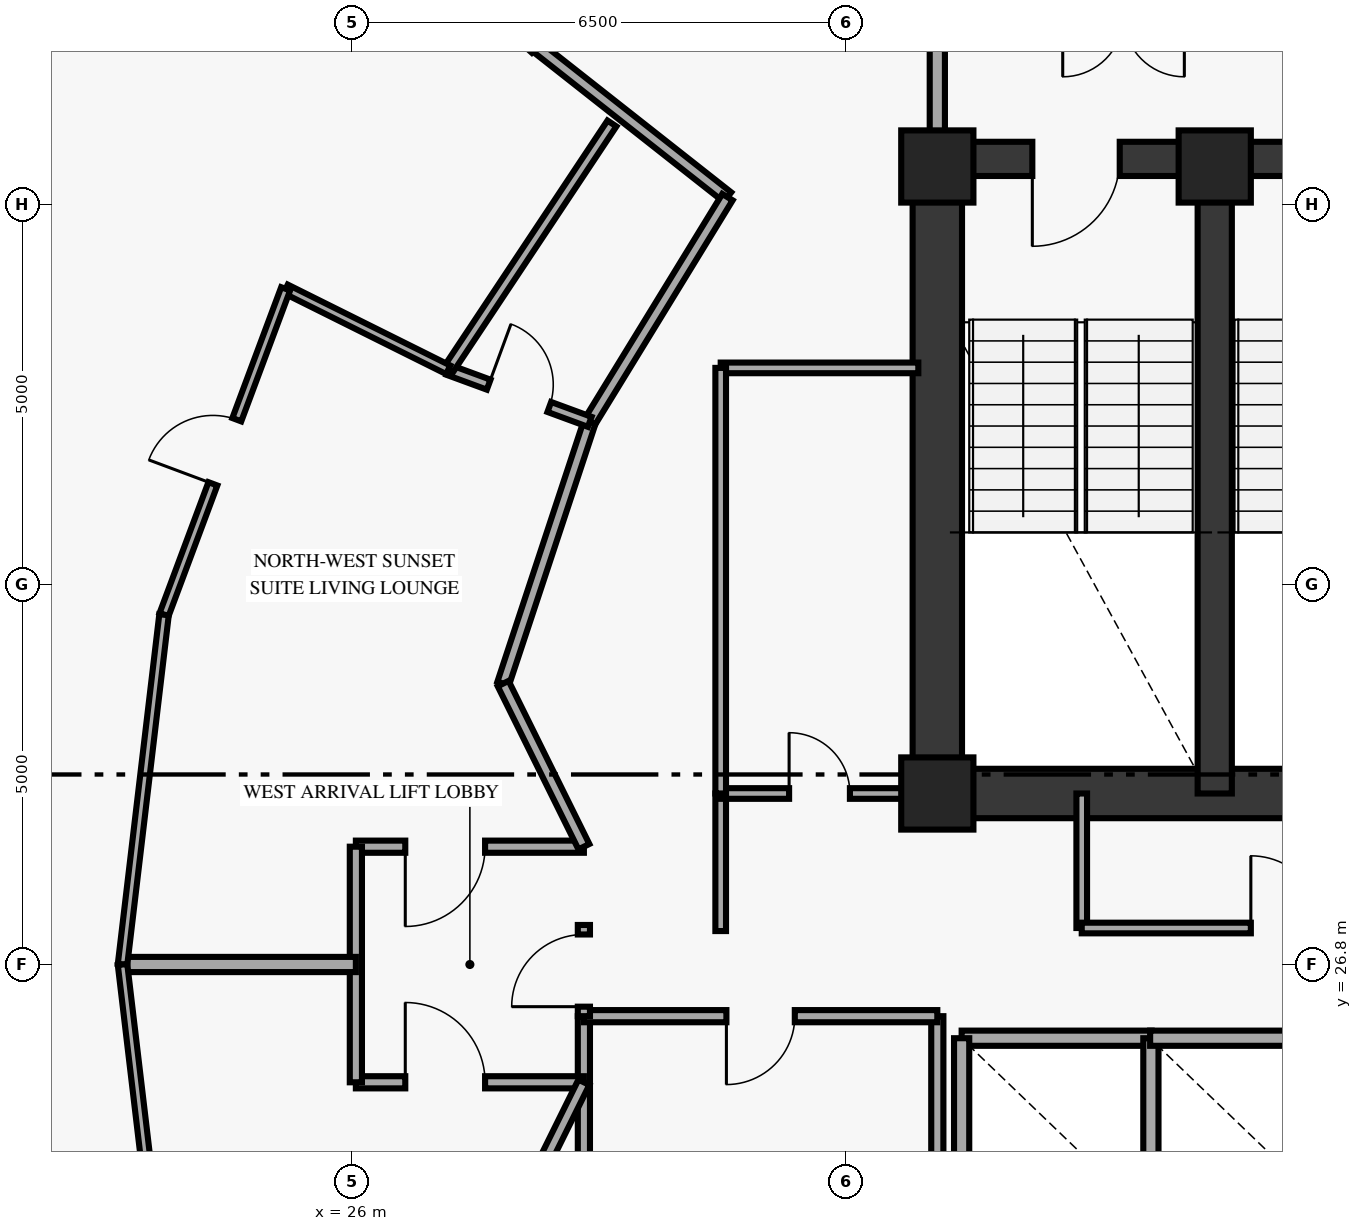
"""IFC4 building model, lengths in metres.
Left out: names, types, materials, properties, quantities, classifications, styles, units other than length and angle.
Written with IfcOpenShell. Run it as: python <this file> out.ifc"""

import sys

from ifc_helpers import new_model, si_unit, direction, frame, frame_2d, origin, origin_2d, place, context, subcontext, project, spatial, rectangle, extrude, element, fill, save


model = new_model("IFC4")
c1 = context("Model", 3, precision=1e-05, world=origin(), true_north=direction((0.0, 1.0)))
c2 = subcontext(c1, "Body", "Model", "MODEL_VIEW")
j1 = project(units=[si_unit("LENGTHUNIT", "METRE"), si_unit("PLANEANGLEUNIT", "RADIAN")], contexts=[c1])
p1 = place(None, origin())
s1 = spatial("IfcSite", under=j1, at=p1, CompositionType="ELEMENT")
p2 = place(p1, origin())
s2 = spatial("IfcBuilding", under=s1, at=p2, CompositionType="ELEMENT")
p3 = place(p2, frame((0.0, 0.0, 192.25)))
s3 = spatial("IfcBuildingStorey", under=s2, at=p3, CompositionType="ELEMENT", Elevation=192.25)
for number, where, z_axis, x_axis in (
    (1, (37.35, 37.3, 0.0), (0.0, 0.0, 1.0), (1.0, 0.0, 0.0)),
    (2, (33.7, 37.3, 0.0), (0.0, 0.0, 1.0), (1.0, 0.0, 0.0)),
    (3, (33.7, 29.05, 0.0), (0.0, 0.0, 1.0), (1.0, 0.0, 0.0)),
):
    element("IfcColumn", number, at=place(p3, frame(where, z_axis=z_axis, x_axis=x_axis)), inside=s3, PredefinedType="PILASTER", context=c2, shape_type="SweptSolid", body=[
        extrude(rectangle(XDim=0.95, YDim=0.95, at=origin_2d()), origin(), (0.0, 0.0, 1.0), 3.35),
    ])
p4 = place(p3, frame((33.7, 29.05, 0.0), z_axis=(0.0, 0.0, 1.0), x_axis=(0.0, 1.0, 0.0)))
e4 = element("IfcWall", 4, at=p4, inside=s3, PredefinedType="SHEAR", context=c2, shape_type="SweptSolid", body=[
    extrude(rectangle(XDim=8.35, YDim=0.65, at=frame_2d((4.175, 0.0))), origin(), (0.0, 0.0, 1.0), 3.35),
])
p5 = place(p3, frame((33.7, 29.05, 0.0), z_axis=(0.0, 0.0, 1.0), x_axis=(1.0, 0.0, 0.0)))
e5 = element("IfcWall", 5, at=p5, inside=s3, PredefinedType="SHEAR", context=c2, shape_type="SweptSolid", body=[
    extrude(rectangle(XDim=10.6, YDim=0.65, at=frame_2d((5.3, 0.0))), origin(), (0.0, 0.0, 1.0), 3.35),
])
p6 = place(p3, frame((37.35, 37.4, 0.0), z_axis=(0.0, 0.0, 1.0), x_axis=(-1.0, 0.0, 0.0)))
e6 = element("IfcWall", 6, at=p6, inside=s3, PredefinedType="SHEAR", context=c2, shape_type="SweptSolid", body=[
    extrude(rectangle(XDim=3.65, YDim=0.45, at=frame_2d((1.825, 0.0))), origin(), (0.0, 0.0, 1.0), 3.35),
])
p7 = place(p6, frame((1.25, 0.0, 0.0)))
e7 = element("IfcOpeningElement", 7, at=p7, cuts=e6, PredefinedType="OPENING", context=c2, shape_type="SweptSolid", body=[
    extrude(rectangle(XDim=1.15, YDim=2.15, at=frame_2d((0.575, 1.075))), frame((0.0, 0.235, 0.0), z_axis=(0.0, -1.0, 0.0), x_axis=(1.0, 0.0, 0.0)), (0.0, 0.0, 1.0), 0.47),
])
p8 = place(p3, frame((37.35, 29.05, 0.0), z_axis=(0.0, 0.0, 1.0), x_axis=(0.0, 1.0, 0.0)))
e8 = element("IfcWall", 8, at=p8, inside=s3, PredefinedType="SHEAR", context=c2, shape_type="SweptSolid", body=[
    extrude(rectangle(XDim=8.35, YDim=0.45, at=frame_2d((4.175, 0.0))), origin(), (0.0, 0.0, 1.0), 3.35),
])
p9 = place(p3, frame((40.65, 37.4, 0.0), z_axis=(0.0, 0.0, 1.0), x_axis=(-1.0, 0.0, 0.0)))
e9 = element("IfcWall", 9, at=p9, inside=s3, PredefinedType="SHEAR", context=c2, shape_type="SweptSolid", body=[
    extrude(rectangle(XDim=3.3, YDim=0.45, at=frame_2d((1.65, 0.0))), origin(), (0.0, 0.0, 1.0), 3.35),
])
p10 = place(p9, frame((1.075, 0.0, 0.0)))
e10 = element("IfcOpeningElement", 10, at=p10, cuts=e9, PredefinedType="OPENING", context=c2, shape_type="SweptSolid", body=[
    extrude(rectangle(XDim=1.15, YDim=2.15, at=frame_2d((0.575, 1.075))), frame((0.0, 0.235, 0.0), z_axis=(0.0, -1.0, 0.0), x_axis=(1.0, 0.0, 0.0)), (0.0, 0.0, 1.0), 0.47),
])
p11 = place(p3, frame((33.7, 37.4, 0.0), z_axis=(0.0, 0.0, 1.0), x_axis=(0.0, 1.0, 0.0)))
e11 = element("IfcWall", 11, at=p11, inside=s3, PredefinedType="SOLIDWALL", context=c2, shape_type="SweptSolid", body=[
    extrude(rectangle(XDim=1.88, YDim=0.2, at=frame_2d((0.94, 0.0))), origin(), (0.0, 0.0, 1.0), 3.35),
])
p12 = place(p3, frame((35.6, 27.28, 0.0), z_axis=(0.0, 0.0, 1.0), x_axis=(0.0, 1.0, 0.0)))
e12 = element("IfcWall", 12, at=p12, inside=s3, PredefinedType="PARTITIONING", context=c2, shape_type="SweptSolid", body=[
    extrude(rectangle(XDim=1.77, YDim=0.14, at=frame_2d((0.885, 0.0))), origin(), (0.0, 0.0, 1.0), 3.35),
])
p13 = place(p3, frame((34.02, 25.83, 0.0), z_axis=(0.0, 0.0, 1.0), x_axis=(1.0, 0.0, 0.0)))
e13 = element("IfcWall", 13, at=p13, inside=s3, PredefinedType="SOLIDWALL", context=c2, shape_type="SweptSolid", body=[
    extrude(rectangle(XDim=2.5, YDim=0.2, at=frame_2d((1.25, 0.0))), origin(), (0.0, 0.0, 1.0), 3.35),
])
for number, where, z_axis, x_axis in (
    (14, (34.02, 23.42, 0.0), (0.0, 0.0, 1.0), (0.0, 1.0, 0.0)),
    (15, (36.51, 23.42, 0.0), (0.0, 0.0, 1.0), (0.0, 1.0, 0.0)),
):
    element("IfcWall", number, at=place(p3, frame(where, z_axis=z_axis, x_axis=x_axis)), inside=s3, PredefinedType="SOLIDWALL", context=c2, shape_type="SweptSolid", body=[
        extrude(rectangle(XDim=2.41, YDim=0.2, at=frame_2d((1.205, 0.0))), origin(), (0.0, 0.0, 1.0), 3.35),
    ])
p14 = place(p3, frame((36.5, 25.83, 0.0), z_axis=(0.0, 0.0, 1.0), x_axis=(1.0, 0.0, 0.0)))
e16 = element("IfcWall", 16, at=p14, inside=s3, PredefinedType="SOLIDWALL", context=c2, shape_type="SweptSolid", body=[
    extrude(rectangle(XDim=2.5, YDim=0.2, at=frame_2d((1.25, 0.0))), origin(), (0.0, 0.0, 1.0), 3.35),
])
p15 = place(p3, frame((29.05, 19.05, 0.0), z_axis=(0.0, 0.0, 1.0), x_axis=(0.0, 1.0, 0.0)))
e17 = element("IfcWall", 17, at=p15, inside=s3, PredefinedType="PARTITIONING", context=c2, shape_type="SweptSolid", body=[
    extrude(rectangle(XDim=7.07, YDim=0.16, at=frame_2d((3.535, 0.0))), origin(), (0.0, 0.0, 1.0), 3.35),
])
p16 = place(p3, frame((33.7, 23.45, 0.0), z_axis=(0.0, 0.0, 1.0), x_axis=(0.0, 1.0, 0.0)))
e18 = element("IfcWall", 18, at=p16, inside=s3, PredefinedType="PARTITIONING", context=c2, shape_type="SweptSolid", body=[
    extrude(rectangle(XDim=2.67, YDim=0.16, at=frame_2d((1.335, 0.0))), origin(), (0.0, 0.0, 1.0), 2.735),
])
p17 = place(p3, frame((33.7, 26.12, 0.0), z_axis=(0.0, 0.0, 1.0), x_axis=(-1.0, 0.0, 0.0)))
e19 = element("IfcWall", 19, at=p17, inside=s3, PredefinedType="PARTITIONING", context=c2, shape_type="SweptSolid", body=[
    extrude(rectangle(XDim=4.65, YDim=0.16, at=frame_2d((2.325, 0.0))), origin(), (0.0, 0.0, 1.0), 3.35),
])
p18 = place(p17, frame((1.875, 0.0, 0.0)))
e20 = element("IfcOpeningElement", 20, at=p18, cuts=e19, PredefinedType="OPENING", context=c2, shape_type="SweptSolid", body=[
    extrude(rectangle(XDim=0.9, YDim=2.1, at=frame_2d((0.45, 1.05))), frame((0.0, 0.09, 0.0), z_axis=(0.0, -1.0, 0.0), x_axis=(1.0, 0.0, 0.0)), (0.0, 0.0, 1.0), 0.18),
])
p19 = place(p3, frame((29.05, 26.12, 0.0), z_axis=(0.0, 0.0, 1.0), x_axis=(0.0, 1.0, 0.0)))
e21 = element("IfcWall", 21, at=p19, inside=s3, PredefinedType="PARTITIONING", context=c2, shape_type="SweptSolid", body=[
    extrude(rectangle(XDim=1.2, YDim=0.16, at=frame_2d((0.6, 0.0))), origin(), (0.0, 0.0, 1.0), 3.35),
])
p20 = place(p19, frame((0.125, 0.0, 0.0)))
e22 = element("IfcOpeningElement", 22, at=p20, cuts=e21, PredefinedType="OPENING", context=c2, shape_type="SweptSolid", body=[
    extrude(rectangle(XDim=0.95, YDim=2.15, at=frame_2d((0.475, 1.075))), frame((0.0, 0.09, 0.0), z_axis=(0.0, -1.0, 0.0), x_axis=(1.0, 0.0, 0.0)), (0.0, 0.0, 1.0), 0.18),
])
p21 = place(p3, frame((35.6, 27.28, 0.0), z_axis=(0.0, 0.0, 1.0), x_axis=(1.0, 0.0, 0.0)))
e23 = element("IfcWall", 23, at=p21, inside=s3, PredefinedType="PARTITIONING", context=c2, shape_type="SweptSolid", body=[
    extrude(rectangle(XDim=5.4, YDim=0.14, at=frame_2d((2.7, 0.0))), origin(), (0.0, 0.0, 1.0), 3.35),
])
p22 = place(p21, frame((2.225, 0.0, 0.0)))
e24 = element("IfcOpeningElement", 24, at=p22, cuts=e23, PredefinedType="OPENING", context=c2, shape_type="SweptSolid", body=[
    extrude(rectangle(XDim=0.95, YDim=2.1, at=frame_2d((0.475, 1.05))), frame((0.0, 0.08, 0.0), z_axis=(0.0, -1.0, 0.0), x_axis=(1.0, 0.0, 0.0)), (0.0, 0.0, 1.0), 0.16),
])
p23 = place(p3, frame((30.85, 27.24, 0.0), z_axis=(0.0, 0.0, 1.0), x_axis=(0.0, 1.0, 0.0)))
e25 = element("IfcWall", 25, at=p23, inside=s3, PredefinedType="PARTITIONING", context=c2, shape_type="SweptSolid", body=[
    extrude(rectangle(XDim=1.81, YDim=0.14, at=frame_2d((0.905, 0.0))), origin(), (0.0, 0.0, 1.0), 3.35),
])
p24 = place(p3, frame((30.85, 29.05, 0.0), z_axis=(0.0, 0.0, 1.0), x_axis=(1.0, 0.0, 0.0)))
e26 = element("IfcWall", 26, at=p24, inside=s3, PredefinedType="PARTITIONING", context=c2, shape_type="SweptSolid", body=[
    extrude(rectangle(XDim=2.6, YDim=0.14, at=frame_2d((1.3, 0.0))), origin(), (0.0, 0.0, 1.0), 2.31),
])
p25 = place(p24, frame((0.9, 0.0, 0.0)))
e27 = element("IfcOpeningElement", 27, at=p25, cuts=e26, PredefinedType="OPENING", context=c2, shape_type="SweptSolid", body=[
    extrude(rectangle(XDim=0.8, YDim=2.05, at=frame_2d((0.4, 1.025))), frame((0.0, 0.08, 0.0), z_axis=(0.0, -1.0, 0.0), x_axis=(1.0, 0.0, 0.0)), (0.0, 0.0, 1.0), 0.16),
])
p26 = place(p3, frame((30.85, 34.65, 0.0), z_axis=(0.0, 0.0, 1.0), x_axis=(1.0, 0.0, 0.0)))
e28 = element("IfcWall", 28, at=p26, inside=s3, PredefinedType="PARTITIONING", context=c2, shape_type="SweptSolid", body=[
    extrude(rectangle(XDim=2.6, YDim=0.14, at=frame_2d((1.3, 0.0))), origin(), (0.0, 0.0, 1.0), 3.35),
])
p27 = place(p3, frame((30.85, 29.05, 0.0), z_axis=(0.0, 0.0, 1.0), x_axis=(0.0, 1.0, 0.0)))
e29 = element("IfcWall", 29, at=p27, inside=s3, PredefinedType="PARTITIONING", context=c2, shape_type="SweptSolid", body=[
    extrude(rectangle(XDim=5.6, YDim=0.14, at=frame_2d((2.8, 0.0))), origin(), (0.0, 0.0, 1.0), 3.35),
])
p28 = place(p3, frame((30.939, 36.897, 0.0), z_axis=(0.0, 0.0, 1.0), x_axis=(-0.785635850026, 0.618689187843, 0.0)))
e30 = element("IfcWall", 30, at=p28, inside=s3, PredefinedType="PARTITIONING", context=c2, shape_type="SweptSolid", body=[
    extrude(rectangle(XDim=3.192, YDim=0.16, at=frame_2d((1.596, 0.0))), origin(), (0.0, 0.0, 1.0), 3.35),
])
p29 = place(p3, frame((28.431, 38.872, 0.0), z_axis=(0.0, 0.0, 1.0), x_axis=(-0.742576754187, 0.669760975379, 0.0)))
e31 = element("IfcWall", 31, at=p29, inside=s3, PredefinedType="PARTITIONING", context=c2, shape_type="SweptSolid", body=[
    extrude(rectangle(XDim=2.032, YDim=0.2, at=frame_2d((1.016, 0.0))), origin(), (0.0, 0.0, 1.0), 3.35),
])
p30 = place(p3, frame((30.939, 36.897, 0.0), z_axis=(0.0, 0.0, 1.0), x_axis=(-0.522486120877, -0.852647789823, 0.0)))
e32 = element("IfcWall", 32, at=p30, inside=s3, PredefinedType="PARTITIONING", context=c2, shape_type="SweptSolid", body=[
    extrude(rectangle(XDim=3.468, YDim=0.16, at=frame_2d((1.734, 0.0))), origin(), (0.0, 0.0, 1.0), 3.35),
])
p31 = place(p3, frame((29.127, 33.94, 0.0), z_axis=(0.0, 0.0, 1.0), x_axis=(-0.313985571683, -0.949427754374, 0.0)))
e33 = element("IfcWall", 33, at=p31, inside=s3, PredefinedType="PARTITIONING", context=c2, shape_type="SweptSolid", body=[
    extrude(rectangle(XDim=3.627, YDim=0.16, at=frame_2d((1.813, 0.0))), origin(), (0.0, 0.0, 1.0), 3.35),
])
p32 = place(p3, frame((26.05, 28.35, 0.0), z_axis=(0.0, 0.0, 1.0), x_axis=(1.0, 0.0, 0.0)))
e34 = element("IfcWall", 34, at=p32, inside=s3, PredefinedType="PARTITIONING", context=c2, shape_type="SweptSolid", body=[
    extrude(rectangle(XDim=3.0, YDim=0.16, at=frame_2d((1.5, 0.0))), origin(), (0.0, 0.0, 1.0), 2.31),
])
p33 = place(p32, frame((0.65, 0.0, 0.0)))
e35 = element("IfcOpeningElement", 35, at=p33, cuts=e34, PredefinedType="OPENING", context=c2, shape_type="SweptSolid", body=[
    extrude(rectangle(XDim=1.05, YDim=2.15, at=frame_2d((0.525, 1.075))), frame((0.0, 0.09, 0.0), z_axis=(0.0, -1.0, 0.0), x_axis=(1.0, 0.0, 0.0)), (0.0, 0.0, 1.0), 0.18),
])
p34 = place(p3, frame((26.05, 25.25, 0.0), z_axis=(0.0, 0.0, 1.0), x_axis=(1.0, 0.0, 0.0)))
e36 = element("IfcWall", 36, at=p34, inside=s3, PredefinedType="PARTITIONING", context=c2, shape_type="SweptSolid", body=[
    extrude(rectangle(XDim=3.0, YDim=0.16, at=frame_2d((1.5, 0.0))), origin(), (0.0, 0.0, 1.0), 3.35),
])
p35 = place(p34, frame((0.65, 0.0, 0.0)))
e37 = element("IfcOpeningElement", 37, at=p35, cuts=e36, PredefinedType="OPENING", context=c2, shape_type="SweptSolid", body=[
    extrude(rectangle(XDim=1.05, YDim=2.15, at=frame_2d((0.525, 1.075))), frame((0.0, 0.09, 0.0), z_axis=(0.0, -1.0, 0.0), x_axis=(1.0, 0.0, 0.0)), (0.0, 0.0, 1.0), 0.18),
])
p36 = place(p3, frame((26.05, 25.25, 0.0), z_axis=(0.0, 0.0, 1.0), x_axis=(0.0, 1.0, 0.0)))
e38 = element("IfcWall", 38, at=p36, inside=s3, PredefinedType="PARTITIONING", context=c2, shape_type="SweptSolid", body=[
    extrude(rectangle(XDim=3.1, YDim=0.16, at=frame_2d((1.55, 0.0))), origin(), (0.0, 0.0, 1.0), 3.35),
])
for number, where, z_axis, x_axis in (
    (39, (27.988, 30.496, 0.0), (0.0, 0.0, 1.0), (0.444, -0.896, 0.0)),
    (40, (27.988, 23.104, 0.0), (0.0, 0.0, 1.0), (0.444, 0.896, 0.0)),
):
    element("IfcWall", number, at=place(p3, frame(where, z_axis=z_axis, x_axis=x_axis)), inside=s3, PredefinedType="PARTITIONING", context=c2, shape_type="SweptSolid", body=[
        extrude(rectangle(XDim=2.394, YDim=0.16, at=frame_2d((1.197, 0.0))), origin(), (0.0, 0.0, 1.0), 3.35),
    ])
p37 = place(p3, frame((26.05, 26.8, 0.0), z_axis=(0.0, 0.0, 1.0), x_axis=(-1.0, 0.0, 0.0)))
e41 = element("IfcWall", 41, at=p37, inside=s3, PredefinedType="PARTITIONING", context=c2, shape_type="SweptSolid", body=[
    extrude(rectangle(XDim=3.07, YDim=0.2, at=frame_2d((1.535, 0.0))), origin(), (0.0, 0.0, 1.0), 3.35),
])
p38 = place(p3, frame((27.265, 34.625, 0.0), z_axis=(0.0, 0.0, 1.0), x_axis=(0.938500583084, -0.345277649945, 0.0)))
e42 = element("IfcWall", 42, at=p38, inside=s3, PredefinedType="PARTITIONING", context=c2, shape_type="SweptSolid", body=[
    extrude(rectangle(XDim=1.984, YDim=0.14, at=frame_2d((0.992, 0.0))), origin(), (0.0, 0.0, 1.0), 3.35),
])
p39 = place(p38, frame((0.567, 0.0, 0.0)))
e43 = element("IfcOpeningElement", 43, at=p39, cuts=e42, PredefinedType="OPENING", context=c2, shape_type="SweptSolid", body=[
    extrude(rectangle(XDim=0.85, YDim=2.1, at=frame_2d((0.425, 1.05))), frame((0.0, 0.08, 0.0), z_axis=(0.0, -1.0, 0.0), x_axis=(1.0, 0.0, 0.0)), (0.0, 0.0, 1.0), 0.16),
])
p40 = place(p3, frame((29.419, 37.866, 0.0), z_axis=(0.0, 0.0, 1.0), x_axis=(-0.553526949376, -0.832831265212, 0.0)))
e44 = element("IfcWall", 44, at=p40, inside=s3, PredefinedType="PARTITIONING", context=c2, shape_type="SweptSolid", body=[
    extrude(rectangle(XDim=3.892, YDim=0.14, at=frame_2d((1.946, 0.0))), origin(), (0.0, 0.0, 1.0), 3.35),
])
p41 = place(p3, frame((27.265, 34.625, 0.0), z_axis=(0.0, 0.0, 1.0), x_axis=(-0.895182030291, 0.445700720937, 0.0)))
e45 = element("IfcWall", 45, at=p41, inside=s3, PredefinedType="PARTITIONING", context=c2, shape_type="SweptSolid", body=[
    extrude(rectangle(XDim=2.389, YDim=0.125, at=frame_2d((1.195, 0.0))), origin(), (0.0, 0.0, 1.0), 3.35),
])
p42 = place(p3, frame((25.126, 35.69, 0.0), z_axis=(0.0, 0.0, 1.0), x_axis=(-0.349620571525, -0.936891378958, 0.0)))
e46 = element("IfcWall", 46, at=p42, inside=s3, PredefinedType="PARTITIONING", context=c2, shape_type="SweptSolid", body=[
    extrude(rectangle(XDim=4.577, YDim=0.125, at=frame_2d((2.288, 0.0))), origin(), (0.0, 0.0, 1.0), 3.35),
])
p43 = place(p42, frame((1.838, 0.0, 0.0)))
e47 = element("IfcOpeningElement", 47, at=p43, cuts=e46, PredefinedType="OPENING", context=c2, shape_type="SweptSolid", body=[
    extrude(rectangle(XDim=0.9, YDim=2.1, at=frame_2d((0.45, 1.05))), frame((0.0, 0.073, 0.0), z_axis=(0.0, -1.0, 0.0), x_axis=(1.0, 0.0, 0.0)), (0.0, 0.0, 1.0), 0.145),
])
for number, where, z_axis, x_axis in (
    (48, (23.526, 31.402, 0.0), (0.0, 0.0, 1.0), (-0.118, -0.993, 0.0)),
    (49, (22.98, 26.8, 0.0), (0.0, 0.0, 1.0), (0.118, -0.993, 0.0)),
):
    element("IfcWall", number, at=place(p3, frame(where, z_axis=z_axis, x_axis=x_axis)), inside=s3, PredefinedType="PARTITIONING", context=c2, shape_type="SweptSolid", body=[
        extrude(rectangle(XDim=4.634, YDim=0.125, at=frame_2d((2.317, 0.0))), origin(), (0.0, 0.0, 1.0), 3.35),
    ])
p44 = place(p7, origin())
e50 = element("IfcDoor", 50, at=p44, inside=s3, OperationType="SINGLE_SWING_RIGHT", PredefinedType="DOOR", context=c2, shape_type="SweptSolid", body=[
    extrude(rectangle(XDim=1.15, YDim=2.15, at=frame_2d((0.575, 1.075))), frame((0.0, 0.025, 0.0), z_axis=(0.0, -1.0, 0.0), x_axis=(1.0, 0.0, 0.0)), (0.0, 0.0, 1.0), 0.05),
])
fill(e7, e50)
p45 = place(p18, origin())
e51 = element("IfcDoor", 51, at=p45, inside=s3, OperationType="SINGLE_SWING_RIGHT", PredefinedType="DOOR", context=c2, shape_type="SweptSolid", body=[
    extrude(rectangle(XDim=0.9, YDim=2.1, at=frame_2d((0.45, 1.05))), frame((0.0, 0.025, 0.0), z_axis=(0.0, -1.0, 0.0), x_axis=(1.0, 0.0, 0.0)), (0.0, 0.0, 1.0), 0.05),
])
fill(e20, e51)
p46 = place(p20, origin())
e52 = element("IfcDoor", 52, at=p46, inside=s3, OperationType="SINGLE_SWING_RIGHT", PredefinedType="DOOR", context=c2, shape_type="SweptSolid", body=[
    extrude(rectangle(XDim=0.95, YDim=2.15, at=frame_2d((0.475, 1.075))), frame((0.0, 0.025, 0.0), z_axis=(0.0, -1.0, 0.0), x_axis=(1.0, 0.0, 0.0)), (0.0, 0.0, 1.0), 0.05),
])
fill(e22, e52)
p47 = place(p22, origin())
e53 = element("IfcDoor", 53, at=p47, inside=s3, OperationType="SINGLE_SWING_LEFT", PredefinedType="DOOR", context=c2, shape_type="SweptSolid", body=[
    extrude(rectangle(XDim=0.95, YDim=2.1, at=frame_2d((0.475, 1.05))), frame((0.0, 0.025, 0.0), z_axis=(0.0, -1.0, 0.0), x_axis=(1.0, 0.0, 0.0)), (0.0, 0.0, 1.0), 0.05),
])
fill(e24, e53)
p48 = place(p25, origin())
e54 = element("IfcDoor", 54, at=p48, inside=s3, OperationType="SINGLE_SWING_LEFT", PredefinedType="DOOR", context=c2, shape_type="SweptSolid", body=[
    extrude(rectangle(XDim=0.8, YDim=2.05, at=frame_2d((0.4, 1.025))), frame((0.0, 0.025, 0.0), z_axis=(0.0, -1.0, 0.0), x_axis=(1.0, 0.0, 0.0)), (0.0, 0.0, 1.0), 0.05),
])
fill(e27, e54)
p49 = place(p33, origin())
e55 = element("IfcDoor", 55, at=p49, inside=s3, OperationType="SINGLE_SWING_LEFT", PredefinedType="DOOR", context=c2, shape_type="SweptSolid", body=[
    extrude(rectangle(XDim=1.05, YDim=2.15, at=frame_2d((0.525, 1.075))), frame((0.0, 0.025, 0.0), z_axis=(0.0, -1.0, 0.0), x_axis=(1.0, 0.0, 0.0)), (0.0, 0.0, 1.0), 0.05),
])
fill(e35, e55)
p50 = place(p35, origin())
e56 = element("IfcDoor", 56, at=p50, inside=s3, OperationType="SINGLE_SWING_LEFT", PredefinedType="DOOR", context=c2, shape_type="SweptSolid", body=[
    extrude(rectangle(XDim=1.05, YDim=2.15, at=frame_2d((0.525, 1.075))), frame((0.0, 0.025, 0.0), z_axis=(0.0, -1.0, 0.0), x_axis=(1.0, 0.0, 0.0)), (0.0, 0.0, 1.0), 0.05),
])
fill(e37, e56)
p51 = place(p39, origin())
e57 = element("IfcDoor", 57, at=p51, inside=s3, OperationType="SINGLE_SWING_LEFT", PredefinedType="DOOR", context=c2, shape_type="SweptSolid", body=[
    extrude(rectangle(XDim=0.85, YDim=2.1, at=frame_2d((0.425, 1.05))), frame((0.0, 0.025, 0.0), z_axis=(0.0, -1.0, 0.0), x_axis=(1.0, 0.0, 0.0)), (0.0, 0.0, 1.0), 0.05),
])
fill(e43, e57)
p52 = place(p43, origin())
e58 = element("IfcDoor", 58, at=p52, inside=s3, OperationType="SINGLE_SWING_RIGHT", PredefinedType="DOOR", context=c2, shape_type="SweptSolid", body=[
    extrude(rectangle(XDim=0.9, YDim=2.1, at=frame_2d((0.45, 1.05))), frame((0.0, 0.025, 0.0), z_axis=(0.0, -1.0, 0.0), x_axis=(1.0, 0.0, 0.0)), (0.0, 0.0, 1.0), 0.05),
])
fill(e47, e58)
save(model, sys.argv[1])
